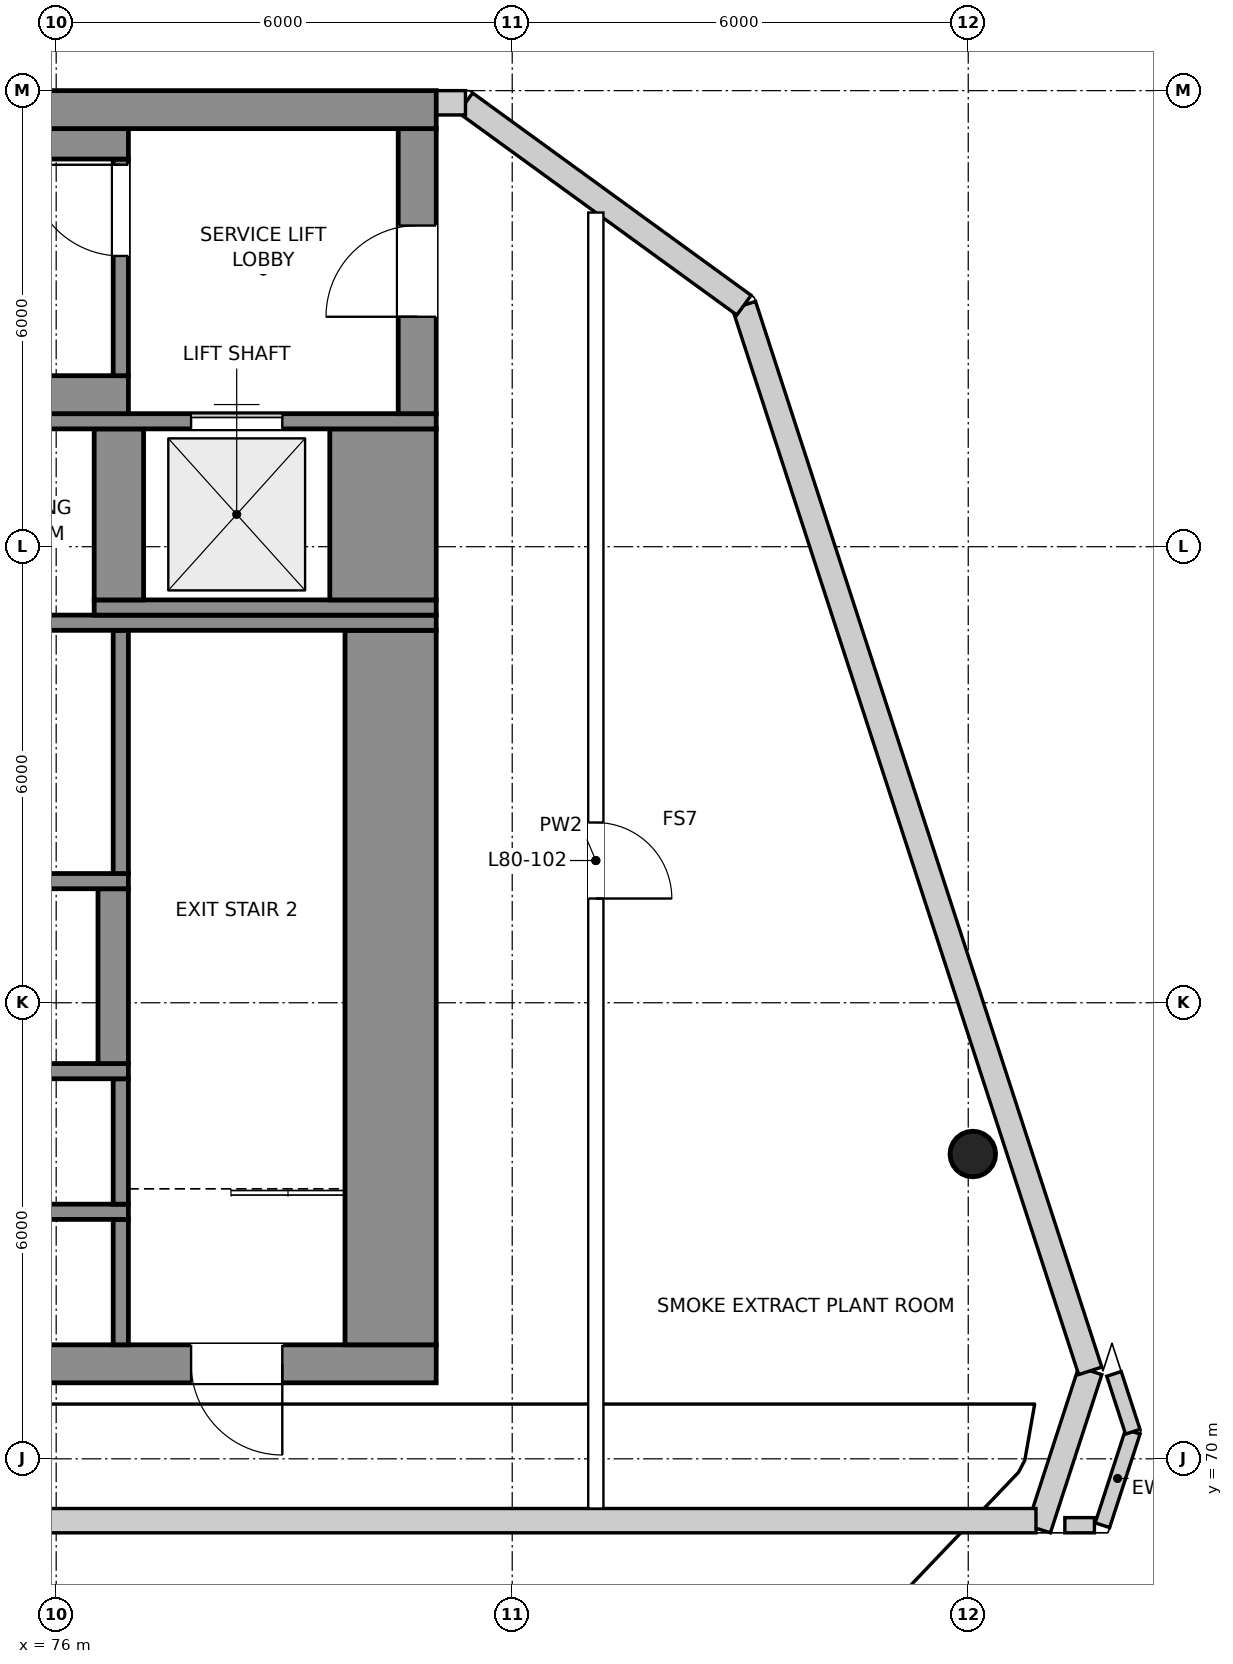
"""IFC4 building model, lengths in metres.
Left out: names, types, materials, properties, quantities, classifications, styles, units other than length and angle.
Written with IfcOpenShell. Run it as: python <this file> out.ifc"""

import sys

from ifc_helpers import new_model, si_unit, direction, frame, frame_2d, origin, origin_2d, place, context, subcontext, project, spatial, polyline, rectangle, circle, outline, extrude, element, fill, save


model = new_model("IFC4")
c1 = context("Model", 3, precision=1e-05, world=origin(), true_north=direction((0.0, 1.0)))
c2 = subcontext(c1, "Body", "Model", "MODEL_VIEW")
j1 = project(units=[si_unit("LENGTHUNIT", "METRE"), si_unit("PLANEANGLEUNIT", "RADIAN")], contexts=[c1])
p1 = place(None, origin())
s1 = spatial("IfcSite", under=j1, at=p1, CompositionType="ELEMENT")
p2 = place(p1, origin())
s2 = spatial("IfcBuilding", under=s1, at=p2, CompositionType="ELEMENT")
p3 = place(p2, frame((0.0, 0.0, 342.2)))
s3 = spatial("IfcBuildingStorey", under=s2, at=p3, CompositionType="ELEMENT", Elevation=342.2)
p4 = place(p3, frame((88.06, 74.01, 0.0), z_axis=(0.0, 0.0, 1.0), x_axis=(1.0, 0.0, 0.0)))
e1 = element("IfcColumn", 1, at=p4, inside=s3, PredefinedType="COLUMN", context=c2, shape_type="SweptSolid", body=[
    extrude(circle(Radius=0.3, at=origin_2d()), origin(), (0.0, 0.0, 1.0), 4.5),
])
p5 = place(p3, frame((88.929, 69.076, 0.0), z_axis=(0.0, 0.0, 1.0), x_axis=(0.308990223282, 0.951065214334, 0.0)))
e2 = element("IfcWall", 2, at=p5, inside=s3, PredefinedType="SOLIDWALL", context=c2, shape_type="SweptSolid", body=[
    extrude(outline(polyline([(0.0, 0.0), (2.189, 0.0), (2.189, 4.2), (1.729, 4.2), (0.0, 2.744), (0.0, 0.0)])), frame((0.0, 0.16, 0.0), z_axis=(0.0, -1.0, 0.0), x_axis=(1.0, 0.0, 0.0)), (0.0, 0.0, 1.0), 0.32),
])
p6 = place(p3, frame((89.605, 71.157, 0.0), z_axis=(0.0, 0.0, 1.0), x_axis=(-0.309009679663, 0.951058892958, 0.0)))
e3 = element("IfcWall", 3, at=p6, inside=s3, PredefinedType="SOLIDWALL", context=c2, shape_type="SweptSolid", body=[
    extrude(rectangle(XDim=14.742, YDim=0.32, at=frame_2d((7.371, 0.0))), origin(), (0.0, 0.0, 1.0), 4.2),
])
p7 = place(p3, frame((85.05, 85.178, 0.0), z_axis=(0.0, 0.0, 1.0), x_axis=(-0.809027332235, 0.587771023186, 0.0)))
e4 = element("IfcWall", 4, at=p7, inside=s3, PredefinedType="SOLIDWALL", context=c2, shape_type="SweptSolid", body=[
    extrude(rectangle(XDim=4.53, YDim=0.32, at=frame_2d((2.265, 0.0))), origin(), (0.0, 0.0, 1.0), 4.2),
])
p8 = place(p3, frame((81.385, 87.84, 0.0), z_axis=(0.0, 0.0, 1.0), x_axis=(-1.0, 0.0, 0.0)))
e5 = element("IfcWall", 5, at=p8, inside=s3, PredefinedType="SOLIDWALL", context=c2, shape_type="SweptSolid", body=[
    extrude(rectangle(XDim=0.385, YDim=0.32, at=frame_2d((0.192, 0.0))), origin(), (0.0, 0.0, 1.0), 4.2),
])
p9 = place(p3, frame((51.109, 69.186, 0.0), z_axis=(0.0, 0.0, 1.0), x_axis=(1.0, 0.0, 0.0)))
e6 = element("IfcWall", 6, at=p9, inside=s3, PredefinedType="SOLIDWALL", context=c2, shape_type="SweptSolid", body=[
    extrude(rectangle(XDim=37.782, YDim=0.32, at=frame_2d((18.891, 0.0))), origin(), (0.0, 0.0, 1.0), 2.842),
])
p10 = place(p3, frame((90.165, 70.356, 0.0), z_axis=(0.0, 0.0, 1.0), x_axis=(-0.309026312225, -0.951053488692, 0.0)))
e7 = element("IfcWall", 7, at=p10, inside=s3, PredefinedType="SOLIDWALL", context=c2, shape_type="SweptSolid", body=[
    extrude(rectangle(XDim=1.293, YDim=0.2, at=frame_2d((0.646, 0.0))), origin(), (0.0, 0.0, 1.0), 1.1),
])
p11 = place(p3, frame((89.66, 69.126, 0.0), z_axis=(0.0, 0.0, 1.0), x_axis=(-1.0, 0.0, 0.0)))
e8 = element("IfcWall", 8, at=p11, inside=s3, PredefinedType="SOLIDWALL", context=c2, shape_type="SweptSolid", body=[
    extrude(rectangle(XDim=0.389, YDim=0.2, at=frame_2d((0.195, 0.0))), origin(), (0.0, 0.0, 1.0), 1.1),
])
p12 = place(p3, frame((89.917, 71.117, 0.0), z_axis=(0.0, 0.0, 1.0), x_axis=(0.30898951136, -0.951065445629, 0.0)))
e9 = element("IfcWall", 9, at=p12, inside=s3, PredefinedType="SOLIDWALL", context=c2, shape_type="SweptSolid", body=[
    extrude(rectangle(XDim=0.8, YDim=0.2, at=frame_2d((0.4, 0.0))), origin(), (0.0, 0.0, 1.0), 1.1),
])
p13 = place(p3, frame((59.0, 71.25, 0.0), z_axis=(0.0, 0.0, 1.0), x_axis=(1.0, 0.0, 0.0)))
e10 = element("IfcWall", 10, at=p13, inside=s3, PredefinedType="SHEAR", context=c2, shape_type="SweptSolid", body=[
    extrude(rectangle(XDim=22.0, YDim=0.5, at=frame_2d((11.0, 0.0))), origin(), (0.0, 0.0, 1.0), 4.5),
])
p14 = place(p13, frame((2.025, 0.0, 0.0)))
e11 = element("IfcOpeningElement", 11, at=p14, cuts=e10, PredefinedType="OPENING", context=c2, shape_type="SweptSolid", body=[
    extrude(rectangle(XDim=1.2, YDim=2.1, at=frame_2d((0.6, 1.05))), frame((0.0, 0.26, 0.0), z_axis=(0.0, -1.0, 0.0), x_axis=(1.0, 0.0, 0.0)), (0.0, 0.0, 1.0), 0.52),
])
p15 = place(p13, frame((18.775, 0.0, 0.0)))
e12 = element("IfcOpeningElement", 12, at=p15, cuts=e10, PredefinedType="OPENING", context=c2, shape_type="SweptSolid", body=[
    extrude(rectangle(XDim=1.2, YDim=2.1, at=frame_2d((0.6, 1.05))), frame((0.0, 0.26, 0.0), z_axis=(0.0, -1.0, 0.0), x_axis=(1.0, 0.0, 0.0)), (0.0, 0.0, 1.0), 0.52),
])
p16 = place(p13, frame((10.0, 0.0, 0.0)))
e13 = element("IfcOpeningElement", 13, at=p16, cuts=e10, PredefinedType="OPENING", context=c2, shape_type="SweptSolid", body=[
    extrude(rectangle(XDim=2.0, YDim=2.1, at=frame_2d((1.0, 1.05))), frame((0.0, 0.26, 0.0), z_axis=(0.0, -1.0, 0.0), x_axis=(1.0, 0.0, 0.0)), (0.0, 0.0, 1.0), 0.52),
])
p17 = place(p3, frame((76.85, 71.5, 0.0), z_axis=(0.0, 0.0, 1.0), x_axis=(0.0, 1.0, 0.0)))
e14 = element("IfcWall", 14, at=p17, inside=s3, PredefinedType="SHEAR", context=c2, shape_type="SweptSolid", body=[
    extrude(rectangle(XDim=1.65, YDim=0.2, at=frame_2d((0.825, 0.0))), origin(), (0.0, 0.0, 1.0), 4.5),
])
p18 = place(p3, frame((80.4, 71.5, 0.0), z_axis=(0.0, 0.0, 1.0), x_axis=(0.0, 1.0, 0.0)))
e15 = element("IfcWall", 15, at=p18, inside=s3, PredefinedType="SHEAR", context=c2, shape_type="SweptSolid", body=[
    extrude(rectangle(XDim=9.4, YDim=1.2, at=frame_2d((4.7, 0.0))), origin(), (0.0, 0.0, 1.0), 4.5),
])
p19 = place(p3, frame((71.25, 73.25, 0.0), z_axis=(0.0, 0.0, 1.0), x_axis=(1.0, 0.0, 0.0)))
e16 = element("IfcWall", 16, at=p19, inside=s3, PredefinedType="SHEAR", context=c2, shape_type="SweptSolid", body=[
    extrude(rectangle(XDim=5.7, YDim=0.2, at=frame_2d((2.85, 0.0))), origin(), (0.0, 0.0, 1.0), 4.5),
])
p20 = place(p3, frame((76.85, 73.35, 0.0), z_axis=(0.0, 0.0, 1.0), x_axis=(0.0, 1.0, 0.0)))
e17 = element("IfcWall", 17, at=p20, inside=s3, PredefinedType="SHEAR", context=c2, shape_type="SweptSolid", body=[
    extrude(rectangle(XDim=1.65, YDim=0.2, at=frame_2d((0.825, 0.0))), origin(), (0.0, 0.0, 1.0), 4.5),
])
p21 = place(p3, frame((71.25, 75.1, 0.0), z_axis=(0.0, 0.0, 1.0), x_axis=(1.0, 0.0, 0.0)))
e18 = element("IfcWall", 18, at=p21, inside=s3, PredefinedType="SHEAR", context=c2, shape_type="SweptSolid", body=[
    extrude(rectangle(XDim=5.7, YDim=0.2, at=frame_2d((2.85, 0.0))), origin(), (0.0, 0.0, 1.0), 4.5),
])
p22 = place(p3, frame((76.75, 75.2, 0.0), z_axis=(0.0, 0.0, 1.0), x_axis=(0.0, 1.0, 0.0)))
e19 = element("IfcWall", 19, at=p22, inside=s3, PredefinedType="SHEAR", context=c2, shape_type="SweptSolid", body=[
    extrude(rectangle(XDim=2.3, YDim=0.4, at=frame_2d((1.15, 0.0))), origin(), (0.0, 0.0, 1.0), 4.5),
])
p23 = place(p3, frame((71.25, 77.6, 0.0), z_axis=(0.0, 0.0, 1.0), x_axis=(1.0, 0.0, 0.0)))
e20 = element("IfcWall", 20, at=p23, inside=s3, PredefinedType="SHEAR", context=c2, shape_type="SweptSolid", body=[
    extrude(rectangle(XDim=5.7, YDim=0.2, at=frame_2d((2.85, 0.0))), origin(), (0.0, 0.0, 1.0), 4.5),
])
p24 = place(p23, frame((2.3, 0.0, 0.0)))
e21 = element("IfcOpeningElement", 21, at=p24, cuts=e20, PredefinedType="OPENING", context=c2, shape_type="SweptSolid", body=[
    extrude(rectangle(XDim=0.9, YDim=2.1, at=frame_2d((0.45, 1.05))), frame((0.0, 0.11, 0.0), z_axis=(0.0, -1.0, 0.0), x_axis=(1.0, 0.0, 0.0)), (0.0, 0.0, 1.0), 0.22),
])
p25 = place(p3, frame((76.85, 77.7, 0.0), z_axis=(0.0, 0.0, 1.0), x_axis=(0.0, 1.0, 0.0)))
e22 = element("IfcWall", 22, at=p25, inside=s3, PredefinedType="SHEAR", context=c2, shape_type="SweptSolid", body=[
    extrude(rectangle(XDim=3.2, YDim=0.2, at=frame_2d((1.6, 0.0))), origin(), (0.0, 0.0, 1.0), 4.5),
])
p26 = place(p3, frame((59.0, 81.0, 0.0), z_axis=(0.0, 0.0, 1.0), x_axis=(1.0, 0.0, 0.0)))
e23 = element("IfcWall", 23, at=p26, inside=s3, PredefinedType="SHEAR", context=c2, shape_type="SweptSolid", body=[
    extrude(rectangle(XDim=22.0, YDim=0.2, at=frame_2d((11.0, 0.0))), origin(), (0.0, 0.0, 1.0), 4.5),
])
p27 = place(p26, frame((11.85, 0.0, 0.0)))
e24 = element("IfcOpeningElement", 24, at=p27, cuts=e23, PredefinedType="OPENING", context=c2, shape_type="SweptSolid", body=[
    extrude(rectangle(XDim=0.9, YDim=2.1, at=frame_2d((0.45, 1.05))), frame((0.0, 0.11, 0.0), z_axis=(0.0, -1.0, 0.0), x_axis=(1.0, 0.0, 0.0)), (0.0, 0.0, 1.0), 0.22),
])
p28 = place(p26, frame((15.825, 0.0, 0.0)))
e25 = element("IfcOpeningElement", 25, at=p28, cuts=e23, PredefinedType="OPENING", context=c2, shape_type="SweptSolid", body=[
    extrude(rectangle(XDim=0.9, YDim=2.1, at=frame_2d((0.45, 1.05))), frame((0.0, 0.11, 0.0), z_axis=(0.0, -1.0, 0.0), x_axis=(1.0, 0.0, 0.0)), (0.0, 0.0, 1.0), 0.22),
])
p29 = place(p3, frame((76.5, 81.2, 0.0), z_axis=(0.0, 0.0, 1.0), x_axis=(1.0, 0.0, 0.0)))
e26 = element("IfcWall", 26, at=p29, inside=s3, PredefinedType="SHEAR", context=c2, shape_type="SweptSolid", body=[
    extrude(rectangle(XDim=4.5, YDim=0.2, at=frame_2d((2.25, 0.0))), origin(), (0.0, 0.0, 1.0), 4.5),
])
p30 = place(p3, frame((76.825, 81.3, 0.0), z_axis=(0.0, 0.0, 1.0), x_axis=(0.0, 1.0, 0.0)))
e27 = element("IfcWall", 27, at=p30, inside=s3, PredefinedType="SHEAR", context=c2, shape_type="SweptSolid", body=[
    extrude(rectangle(XDim=2.25, YDim=0.65, at=frame_2d((1.125, 0.0))), origin(), (0.0, 0.0, 1.0), 4.5),
])
p31 = place(p3, frame((80.3, 81.3, 0.0), z_axis=(0.0, 0.0, 1.0), x_axis=(0.0, 1.0, 0.0)))
e28 = element("IfcWall", 28, at=p31, inside=s3, PredefinedType="SHEAR", context=c2, shape_type="SweptSolid", body=[
    extrude(rectangle(XDim=2.25, YDim=1.4, at=frame_2d((1.125, 0.0))), origin(), (0.0, 0.0, 1.0), 4.5),
])
p32 = place(p3, frame((59.0, 83.65, 0.0), z_axis=(0.0, 0.0, 1.0), x_axis=(1.0, 0.0, 0.0)))
e29 = element("IfcWall", 29, at=p32, inside=s3, PredefinedType="SHEAR", context=c2, shape_type="SweptSolid", body=[
    extrude(rectangle(XDim=22.0, YDim=0.2, at=frame_2d((11.0, 0.0))), origin(), (0.0, 0.0, 1.0), 4.5),
])
p33 = place(p32, frame((5.125, 0.0, 0.0)))
e30 = element("IfcOpeningElement", 30, at=p33, cuts=e29, PredefinedType="OPENING", context=c2, shape_type="SweptSolid", body=[
    extrude(rectangle(XDim=1.1, YDim=2.1, at=frame_2d((0.55, 1.05))), frame((0.0, 0.11, 0.0), z_axis=(0.0, -1.0, 0.0), x_axis=(1.0, 0.0, 0.0)), (0.0, 0.0, 1.0), 0.22),
])
p34 = place(p32, frame((7.65, 0.0, 0.0)))
e31 = element("IfcOpeningElement", 31, at=p34, cuts=e29, PredefinedType="OPENING", context=c2, shape_type="SweptSolid", body=[
    extrude(rectangle(XDim=1.1, YDim=2.1, at=frame_2d((0.55, 1.05))), frame((0.0, 0.11, 0.0), z_axis=(0.0, -1.0, 0.0), x_axis=(1.0, 0.0, 0.0)), (0.0, 0.0, 1.0), 0.22),
])
p35 = place(p32, frame((18.775, 0.0, 0.0)))
e32 = element("IfcOpeningElement", 32, at=p35, cuts=e29, PredefinedType="OPENING", context=c2, shape_type="SweptSolid", body=[
    extrude(rectangle(XDim=1.2, YDim=2.1, at=frame_2d((0.6, 1.05))), frame((0.0, 0.11, 0.0), z_axis=(0.0, -1.0, 0.0), x_axis=(1.0, 0.0, 0.0)), (0.0, 0.0, 1.0), 0.22),
])
p36 = place(p32, frame((2.075, 0.0, 0.0)))
e33 = element("IfcOpeningElement", 33, at=p36, cuts=e29, PredefinedType="OPENING", context=c2, shape_type="SweptSolid", body=[
    extrude(rectangle(XDim=1.1, YDim=2.1, at=frame_2d((0.55, 1.05))), frame((0.0, 0.11, 0.0), z_axis=(0.0, -1.0, 0.0), x_axis=(1.0, 0.0, 0.0)), (0.0, 0.0, 1.0), 0.22),
])
p37 = place(p3, frame((67.85, 84.0, 0.0), z_axis=(0.0, 0.0, 1.0), x_axis=(1.0, 0.0, 0.0)))
e34 = element("IfcWall", 34, at=p37, inside=s3, PredefinedType="SHEAR", context=c2, shape_type="SweptSolid", body=[
    extrude(rectangle(XDim=9.1, YDim=0.5, at=frame_2d((4.55, 0.0))), origin(), (0.0, 0.0, 1.0), 4.5),
])
p38 = place(p3, frame((80.75, 83.75, 0.0), z_axis=(0.0, 0.0, 1.0), x_axis=(0.0, 1.0, 0.0)))
e35 = element("IfcWall", 35, at=p38, inside=s3, PredefinedType="SHEAR", context=c2, shape_type="SweptSolid", body=[
    extrude(rectangle(XDim=3.75, YDim=0.5, at=frame_2d((1.875, 0.0))), origin(), (0.0, 0.0, 1.0), 4.5),
])
p39 = place(p38, frame((1.275, 0.0, 0.0)))
e36 = element("IfcOpeningElement", 36, at=p39, cuts=e35, PredefinedType="OPENING", context=c2, shape_type="SweptSolid", body=[
    extrude(rectangle(XDim=1.2, YDim=2.1, at=frame_2d((0.6, 1.05))), frame((0.0, 0.26, 0.0), z_axis=(0.0, -1.0, 0.0), x_axis=(1.0, 0.0, 0.0)), (0.0, 0.0, 1.0), 0.52),
])
p40 = place(p3, frame((76.85, 84.25, 0.0), z_axis=(0.0, 0.0, 1.0), x_axis=(0.0, 1.0, 0.0)))
e37 = element("IfcWall", 37, at=p40, inside=s3, PredefinedType="SHEAR", context=c2, shape_type="SweptSolid", body=[
    extrude(rectangle(XDim=2.85, YDim=0.2, at=frame_2d((1.425, 0.0))), origin(), (0.0, 0.0, 1.0), 4.5),
])
p41 = place(p40, frame((1.575, 0.0, 0.0)))
e38 = element("IfcOpeningElement", 38, at=p41, cuts=e37, PredefinedType="OPENING", context=c2, shape_type="SweptSolid", body=[
    extrude(rectangle(XDim=1.2, YDim=2.1, at=frame_2d((0.6, 1.05))), frame((0.0, 0.11, 0.0), z_axis=(0.0, -1.0, 0.0), x_axis=(1.0, 0.0, 0.0)), (0.0, 0.0, 1.0), 0.22),
])
p42 = place(p3, frame((67.85, 87.3, 0.0), z_axis=(0.0, 0.0, 1.0), x_axis=(1.0, 0.0, 0.0)))
e39 = element("IfcWall", 39, at=p42, inside=s3, PredefinedType="SHEAR", context=c2, shape_type="SweptSolid", body=[
    extrude(rectangle(XDim=9.1, YDim=0.4, at=frame_2d((4.55, 0.0))), origin(), (0.0, 0.0, 1.0), 4.5),
])
p43 = place(p3, frame((59.0, 87.75, 0.0), z_axis=(0.0, 0.0, 1.0), x_axis=(1.0, 0.0, 0.0)))
e40 = element("IfcWall", 40, at=p43, inside=s3, PredefinedType="SHEAR", context=c2, shape_type="SweptSolid", body=[
    extrude(rectangle(XDim=22.0, YDim=0.5, at=frame_2d((11.0, 0.0))), origin(), (0.0, 0.0, 1.0), 4.5),
])
p44 = place(p3, frame((83.1, 86.396, 0.0), z_axis=(0.0, 0.0, 1.0), x_axis=(0.0, -1.0, 0.0)))
e41 = element("IfcWall", 41, at=p44, inside=s3, PredefinedType="PARTITIONING", context=c2, shape_type="SweptSolid", body=[
    extrude(outline(polyline([(0.0, 0.0), (17.05, 0.0), (17.05, 2.833), (0.0, 4.2), (0.0, 0.0)])), frame((0.0, 0.1, 0.0), z_axis=(0.0, -1.0, 0.0), x_axis=(1.0, 0.0, 0.0)), (0.0, 0.0, 1.0), 0.2),
])
p45 = place(p44, frame((8.025, 0.0, 0.0)))
e42 = element("IfcOpeningElement", 42, at=p45, cuts=e41, PredefinedType="OPENING", context=c2, shape_type="SweptSolid", body=[
    extrude(rectangle(XDim=1.0, YDim=2.1, at=frame_2d((0.5, 1.05))), frame((0.0, 0.11, 0.0), z_axis=(0.0, -1.0, 0.0), x_axis=(1.0, 0.0, 0.0)), (0.0, 0.0, 1.0), 0.22),
])
p46 = place(p15, frame((1.2, 0.0, 0.0), z_axis=(0.0, 0.0, 1.0), x_axis=(-1.0, 0.0, 0.0)))
e43 = element("IfcDoor", 43, at=p46, inside=s3, OperationType="SINGLE_SWING_LEFT", PredefinedType="DOOR", context=c2, shape_type="SweptSolid", body=[
    extrude(rectangle(XDim=1.2, YDim=2.1, at=frame_2d((0.6, 1.05))), frame((0.0, 0.025, 0.0), z_axis=(0.0, -1.0, 0.0), x_axis=(1.0, 0.0, 0.0)), (0.0, 0.0, 1.0), 0.05),
])
fill(e12, e43)
p47 = place(p41, origin())
e44 = element("IfcDoor", 44, at=p47, inside=s3, OperationType="SINGLE_SWING_RIGHT", PredefinedType="DOOR", context=c2, shape_type="SweptSolid", body=[
    extrude(rectangle(XDim=1.2, YDim=2.1, at=frame_2d((0.6, 1.05))), frame((0.0, 0.025, 0.0), z_axis=(0.0, -1.0, 0.0), x_axis=(1.0, 0.0, 0.0)), (0.0, 0.0, 1.0), 0.05),
])
fill(e38, e44)
p48 = place(p39, origin())
e45 = element("IfcDoor", 45, at=p48, inside=s3, OperationType="SINGLE_SWING_LEFT", PredefinedType="DOOR", context=c2, shape_type="SweptSolid", body=[
    extrude(rectangle(XDim=1.2, YDim=2.1, at=frame_2d((0.6, 1.05))), frame((0.0, 0.025, 0.0), z_axis=(0.0, -1.0, 0.0), x_axis=(1.0, 0.0, 0.0)), (0.0, 0.0, 1.0), 0.05),
])
fill(e36, e45)
p49 = place(p35, origin())
e46 = element("IfcDoor", 46, at=p49, inside=s3, OperationType="DOUBLE_DOOR_SLIDING", PredefinedType="DOOR", context=c2, shape_type="SweptSolid", body=[
    extrude(rectangle(XDim=1.2, YDim=2.1, at=frame_2d((0.6, 1.05))), frame((0.0, 0.025, 0.0), z_axis=(0.0, -1.0, 0.0), x_axis=(1.0, 0.0, 0.0)), (0.0, 0.0, 1.0), 0.05),
])
fill(e32, e46)
p50 = place(p45, origin())
e47 = element("IfcDoor", 47, at=p50, inside=s3, OperationType="SINGLE_SWING_RIGHT", PredefinedType="DOOR", context=c2, shape_type="SweptSolid", body=[
    extrude(rectangle(XDim=1.0, YDim=2.1, at=frame_2d((0.5, 1.05))), frame((0.0, 0.025, 0.0), z_axis=(0.0, -1.0, 0.0), x_axis=(1.0, 0.0, 0.0)), (0.0, 0.0, 1.0), 0.05),
])
fill(e42, e47)
save(model, sys.argv[1])
